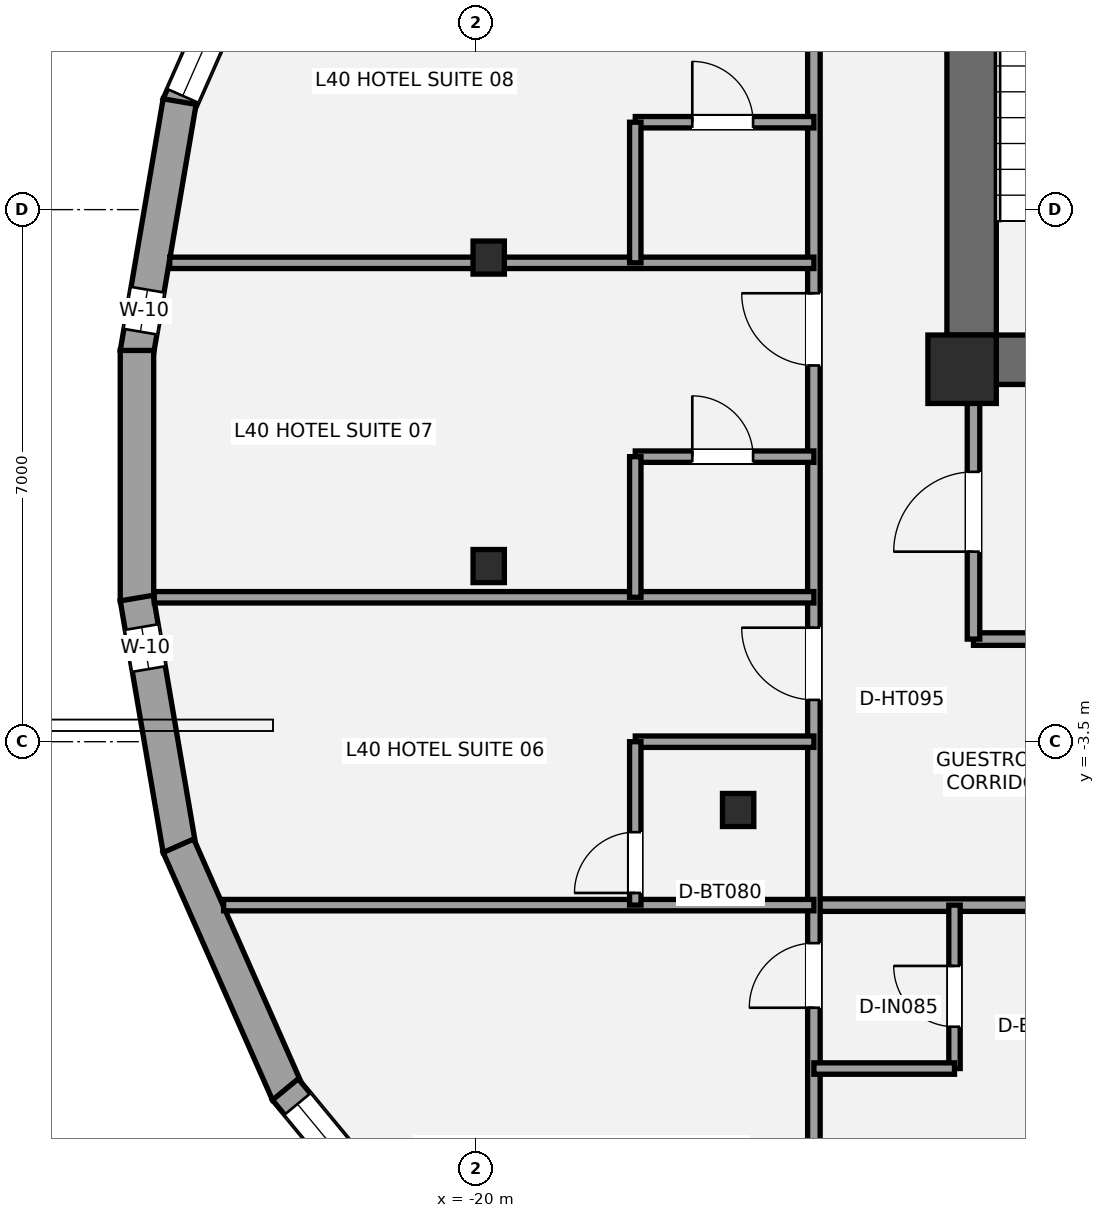
"""IFC4 building model, lengths in metres.
Left out: names, types, materials, properties, quantities, classifications, styles, units other than length and angle.
Written with IfcOpenShell. Run it as: python <this file> out.ifc"""

import sys

from ifc_helpers import new_model, si_unit, direction, frame, frame_2d, origin, origin_2d, place, context, subcontext, project, spatial, rectangle, i_section, extrude, element, fill, save


model = new_model("IFC4")
c1 = context("Model", 3, precision=1e-05, world=origin(), true_north=direction((0.0, 1.0)))
c2 = subcontext(c1, "Body", "Model", "MODEL_VIEW")
j1 = project(units=[si_unit("LENGTHUNIT", "METRE"), si_unit("PLANEANGLEUNIT", "RADIAN")], contexts=[c1])
p1 = place(None, origin())
s1 = spatial("IfcSite", under=j1, at=p1, CompositionType="ELEMENT")
p2 = place(p1, origin())
s2 = spatial("IfcBuilding", under=s1, at=p2, CompositionType="ELEMENT")
p3 = place(p2, frame((0.0, 0.0, 150.2)))
s3 = spatial("IfcBuildingStorey", under=s2, at=p3, CompositionType="ELEMENT", Elevation=150.2)
p4 = place(p3, frame((-13.475, 1.2, 0.0), z_axis=(0.0, 0.0, 1.0), x_axis=(0.0, 1.0, 0.0)))
e1 = element("IfcWall", 1, at=p4, inside=s3, PredefinedType="SHEAR", context=c2, shape_type="SweptSolid", body=[
    extrude(rectangle(XDim=8.45, YDim=0.65, at=frame_2d((4.225, 0.0))), origin(), (0.0, 0.0, 1.0), 3.2),
])
p5 = place(p3, frame((-4.875, 1.525, 0.0), z_axis=(0.0, 0.0, 1.0), x_axis=(-1.0, 0.0, 0.0)))
e2 = element("IfcWall", 2, at=p5, inside=s3, PredefinedType="SHEAR", context=c2, shape_type="SweptSolid", body=[
    extrude(rectangle(XDim=8.925, YDim=0.65, at=frame_2d((4.462, 0.0))), origin(), (0.0, 0.0, 1.0), 3.2),
])
p6 = place(p5, frame((5.425, 0.0, 0.0)))
e3 = element("IfcOpeningElement", 3, at=p6, cuts=e2, PredefinedType="OPENING", context=c2, shape_type="SweptSolid", body=[
    extrude(rectangle(XDim=1.05, YDim=2.15, at=frame_2d((0.525, 1.075))), frame((0.0, 0.335, 0.0), z_axis=(0.0, -1.0, 0.0), x_axis=(1.0, 0.0, 0.0)), (0.0, 0.0, 1.0), 0.67),
])
p7 = place(p5, frame((3.755, 0.0, 0.0)))
e4 = element("IfcOpeningElement", 4, at=p7, cuts=e2, PredefinedType="OPENING", context=c2, shape_type="SweptSolid", body=[
    extrude(rectangle(XDim=1.1, YDim=2.2, at=frame_2d((0.55, 1.1))), frame((0.0, 0.335, 0.0), z_axis=(0.0, -1.0, 0.0), x_axis=(1.0, 0.0, 0.0)), (0.0, 0.0, 1.0), 0.67),
])
p8 = place(p3, frame((-13.6, 1.4, 0.0), z_axis=(0.0, 0.0, 1.0), x_axis=(1.0, 0.0, 0.0)))
e5 = element("IfcColumn", 5, at=p8, inside=s3, PredefinedType="COLUMN", context=c2, shape_type="SweptSolid", body=[
    extrude(rectangle(XDim=0.9, YDim=0.9, at=origin_2d()), origin(), (0.0, 0.0, 1.0), 3.2),
])
for number, where, z_axis, x_axis in (
    (6, (-19.828, 2.869, 0.0), (0.0, 0.0, 1.0), (1.0, 0.0, 0.0)),
    (7, (-19.828, -1.189, 0.0), (0.0, 0.0, 1.0), (1.0, 0.0, 0.0)),
    (8, (-16.547, -4.398, 0.0), (0.0, 0.0, 1.0), (1.0, 0.0, 0.0)),
):
    element("IfcColumn", number, at=place(p3, frame(where, z_axis=z_axis, x_axis=x_axis)), inside=s3, PredefinedType="COLUMN", context=c2, shape_type="SweptSolid", body=[
        extrude(i_section(OverallWidth=0.412, OverallDepth=0.435, WebThickness=0.036, FlangeThickness=0.057, at=origin_2d()), origin(), (0.0, 0.0, 1.0), 3.2),
    ])
p9 = place(p3, frame((-23.911, 4.869, 0.0), z_axis=(0.0, 0.0, 1.0), x_axis=(0.403999745193, 0.914759097186, 0.0)))
e9 = element("IfcWall", 9, at=p9, inside=s3, PredefinedType="STANDARD", context=c2, shape_type="SweptSolid", body=[
    extrude(rectangle(XDim=3.561, YDim=0.44, at=frame_2d((1.78, 0.0))), origin(), (0.0, 0.0, 1.0), 2.315),
])
p10 = place(p9, frame((0.14, 0.0, 0.42)))
e10 = element("IfcOpeningElement", 10, at=p10, cuts=e9, PredefinedType="OPENING", context=c2, shape_type="SweptSolid", body=[
    extrude(rectangle(XDim=0.9, YDim=1.35, at=frame_2d((0.45, 0.675))), frame((0.0, 0.23, 0.0), z_axis=(0.0, -1.0, 0.0), x_axis=(1.0, 0.0, 0.0)), (0.0, 0.0, 1.0), 0.46),
])
p11 = place(p3, frame((-24.459, 1.61, 0.0), z_axis=(0.0, 0.0, 1.0), x_axis=(0.168075929829, 0.985774052109, 0.0)))
e11 = element("IfcWall", 11, at=p11, inside=s3, PredefinedType="STANDARD", context=c2, shape_type="SweptSolid", body=[
    extrude(rectangle(XDim=3.358, YDim=0.44, at=frame_2d((1.679, 0.0))), origin(), (0.0, 0.0, 1.0), 2.315),
])
p12 = place(p11, frame((0.288, 0.0, 0.58)))
e12 = element("IfcOpeningElement", 12, at=p12, cuts=e11, PredefinedType="OPENING", context=c2, shape_type="SweptSolid", body=[
    extrude(rectangle(XDim=0.56, YDim=1.15, at=frame_2d((0.28, 0.575))), frame((0.0, 0.23, 0.0), z_axis=(0.0, -1.0, 0.0), x_axis=(1.0, 0.0, 0.0)), (0.0, 0.0, 1.0), 0.46),
])
p13 = place(p3, frame((-24.456, -1.647, 0.0), z_axis=(0.0, 0.0, 1.0), x_axis=(0.0, 1.0, 0.0)))
e13 = element("IfcWall", 13, at=p13, inside=s3, PredefinedType="STANDARD", context=c2, shape_type="SweptSolid", body=[
    extrude(rectangle(XDim=3.295, YDim=0.44, at=frame_2d((1.647, 0.0))), origin(), (0.0, 0.0, 1.0), 2.315),
])
p14 = place(p3, frame((-23.895, -4.921, 0.0), z_axis=(0.0, 0.0, 1.0), x_axis=(-0.168075929829, 0.985774052109, 0.0)))
e14 = element("IfcWall", 14, at=p14, inside=s3, PredefinedType="STANDARD", context=c2, shape_type="SweptSolid", body=[
    extrude(rectangle(XDim=3.358, YDim=0.44, at=frame_2d((1.679, 0.0))), origin(), (0.0, 0.0, 1.0), 2.315),
])
p15 = place(p14, frame((2.411, 0.0, 0.58)))
e15 = element("IfcOpeningElement", 15, at=p15, cuts=e14, PredefinedType="OPENING", context=c2, shape_type="SweptSolid", body=[
    extrude(rectangle(XDim=0.56, YDim=1.15, at=frame_2d((0.28, 0.575))), frame((0.0, 0.23, 0.0), z_axis=(0.0, -1.0, 0.0), x_axis=(1.0, 0.0, 0.0)), (0.0, 0.0, 1.0), 0.46),
])
p16 = place(p3, frame((-22.472, -8.126, 0.0), z_axis=(0.0, 0.0, 1.0), x_axis=(-0.403999745193, 0.914759097186, 0.0)))
e16 = element("IfcWall", 16, at=p16, inside=s3, PredefinedType="STANDARD", context=c2, shape_type="SweptSolid", body=[
    extrude(rectangle(XDim=3.561, YDim=0.44, at=frame_2d((1.78, 0.0))), origin(), (0.0, 0.0, 1.0), 2.315),
])
p17 = place(p3, frame((-20.014, -11.088, 0.0), z_axis=(0.0, 0.0, 1.0), x_axis=(-0.637002505989, 0.77086173038, 0.0)))
e17 = element("IfcWall", 17, at=p17, inside=s3, PredefinedType="STANDARD", context=c2, shape_type="SweptSolid", body=[
    extrude(rectangle(XDim=3.908, YDim=0.44, at=frame_2d((1.954, 0.0))), origin(), (0.0, 0.0, 1.0), 2.315),
])
p18 = place(p17, frame((2.76, 0.0, 0.58)))
e18 = element("IfcOpeningElement", 18, at=p18, cuts=e17, PredefinedType="OPENING", context=c2, shape_type="SweptSolid", body=[
    extrude(rectangle(XDim=0.9, YDim=1.35, at=frame_2d((0.45, 0.675))), frame((0.0, 0.23, 0.0), z_axis=(0.0, -1.0, 0.0), x_axis=(1.0, 0.0, 0.0)), (0.0, 0.0, 1.0), 0.46),
])
p19 = place(p3, frame((-13.45, -2.15, 0.0), z_axis=(0.0, 0.0, 1.0), x_axis=(1.0, 0.0, 0.0)))
e19 = element("IfcWall", 19, at=p19, inside=s3, PredefinedType="PARTITIONING", context=c2, shape_type="SweptSolid", body=[
    extrude(rectangle(XDim=6.25, YDim=0.165, at=frame_2d((3.125, 0.0))), origin(), (0.0, 0.0, 1.0), 2.473),
])
p20 = place(p3, frame((-13.45, -2.15, 0.0), z_axis=(0.0, 0.0, 1.0), x_axis=(0.0, 1.0, 0.0)))
e20 = element("IfcWall", 20, at=p20, inside=s3, PredefinedType="PARTITIONING", context=c2, shape_type="SweptSolid", body=[
    extrude(rectangle(XDim=3.4, YDim=0.165, at=frame_2d((1.7, 0.0))), origin(), (0.0, 0.0, 1.0), 2.473),
])
p21 = place(p20, frame((1.15, 0.0, 0.0)))
e21 = element("IfcOpeningElement", 21, at=p21, cuts=e20, PredefinedType="OPENING", context=c2, shape_type="SweptSolid", body=[
    extrude(rectangle(XDim=1.05, YDim=2.15, at=frame_2d((0.525, 1.075))), frame((0.0, 0.093, 0.0), z_axis=(0.0, -1.0, 0.0), x_axis=(1.0, 0.0, 0.0)), (0.0, 0.0, 1.0), 0.185),
])
p22 = place(p3, frame((-15.55, -5.65, 0.0), z_axis=(0.0, 0.0, 1.0), x_axis=(1.0, 0.0, 0.0)))
e22 = element("IfcWall", 22, at=p22, inside=s3, PredefinedType="PARTITIONING", context=c2, shape_type="SweptSolid", body=[
    extrude(rectangle(XDim=31.1, YDim=0.165, at=frame_2d((15.55, 0.0))), origin(), (0.0, 0.0, 1.0), 2.398),
])
p23 = place(p22, frame((4.6, 0.0, 0.0)))
e23 = element("IfcOpeningElement", 23, at=p23, cuts=e22, PredefinedType="OPENING", context=c2, shape_type="SweptSolid", body=[
    extrude(rectangle(XDim=0.95, YDim=2.15, at=frame_2d((0.475, 1.075))), frame((0.0, 0.093, 0.0), z_axis=(0.0, -1.0, 0.0), x_axis=(1.0, 0.0, 0.0)), (0.0, 0.0, 1.0), 0.185),
])
p24 = place(p22, frame((11.0, 0.0, 0.0)))
e24 = element("IfcOpeningElement", 24, at=p24, cuts=e22, PredefinedType="OPENING", context=c2, shape_type="SweptSolid", body=[
    extrude(rectangle(XDim=0.95, YDim=2.15, at=frame_2d((0.475, 1.075))), frame((0.0, 0.093, 0.0), z_axis=(0.0, -1.0, 0.0), x_axis=(1.0, 0.0, 0.0)), (0.0, 0.0, 1.0), 0.185),
])
p25 = place(p22, frame((17.4, 0.0, 0.0)))
e25 = element("IfcOpeningElement", 25, at=p25, cuts=e22, PredefinedType="OPENING", context=c2, shape_type="SweptSolid", body=[
    extrude(rectangle(XDim=0.95, YDim=2.15, at=frame_2d((0.475, 1.075))), frame((0.0, 0.093, 0.0), z_axis=(0.0, -1.0, 0.0), x_axis=(1.0, 0.0, 0.0)), (0.0, 0.0, 1.0), 0.185),
])
p26 = place(p22, frame((23.8, 0.0, 0.0)))
e26 = element("IfcOpeningElement", 26, at=p26, cuts=e22, PredefinedType="OPENING", context=c2, shape_type="SweptSolid", body=[
    extrude(rectangle(XDim=0.95, YDim=2.15, at=frame_2d((0.475, 1.075))), frame((0.0, 0.093, 0.0), z_axis=(0.0, -1.0, 0.0), x_axis=(1.0, 0.0, 0.0)), (0.0, 0.0, 1.0), 0.185),
])
p27 = place(p22, frame((29.75, 0.0, 0.0)))
e27 = element("IfcOpeningElement", 27, at=p27, cuts=e22, PredefinedType="OPENING", context=c2, shape_type="SweptSolid", body=[
    extrude(rectangle(XDim=0.95, YDim=2.15, at=frame_2d((0.475, 1.075))), frame((0.0, 0.093, 0.0), z_axis=(0.0, -1.0, 0.0), x_axis=(1.0, 0.0, 0.0)), (0.0, 0.0, 1.0), 0.185),
])
p28 = place(p3, frame((-15.55, -13.587, 0.0), z_axis=(0.0, 0.0, 1.0), x_axis=(0.0, 1.0, 0.0)))
e28 = element("IfcWall", 28, at=p28, inside=s3, PredefinedType="PARTITIONING", context=c2, shape_type="SweptSolid", body=[
    extrude(rectangle(XDim=21.137, YDim=0.165, at=frame_2d((10.568, 0.0))), origin(), (0.0, 0.0, 1.0), 2.473),
])
p29 = place(p28, frame((6.587, 0.0, 0.0)))
e29 = element("IfcOpeningElement", 29, at=p29, cuts=e28, PredefinedType="OPENING", context=c2, shape_type="SweptSolid", body=[
    extrude(rectangle(XDim=0.85, YDim=2.1, at=frame_2d((0.425, 1.05))), frame((0.0, 0.093, 0.0), z_axis=(0.0, -1.0, 0.0), x_axis=(1.0, 0.0, 0.0)), (0.0, 0.0, 1.0), 0.185),
])
p30 = place(p28, frame((10.637, 0.0, 0.0)))
e30 = element("IfcOpeningElement", 30, at=p30, cuts=e28, PredefinedType="OPENING", context=c2, shape_type="SweptSolid", body=[
    extrude(rectangle(XDim=0.95, YDim=2.15, at=frame_2d((0.475, 1.075))), frame((0.0, 0.093, 0.0), z_axis=(0.0, -1.0, 0.0), x_axis=(1.0, 0.0, 0.0)), (0.0, 0.0, 1.0), 0.185),
])
p31 = place(p28, frame((15.037, 0.0, 0.0)))
e31 = element("IfcOpeningElement", 31, at=p31, cuts=e28, PredefinedType="OPENING", context=c2, shape_type="SweptSolid", body=[
    extrude(rectangle(XDim=0.95, YDim=2.15, at=frame_2d((0.475, 1.075))), frame((0.0, 0.093, 0.0), z_axis=(0.0, -1.0, 0.0), x_axis=(1.0, 0.0, 0.0)), (0.0, 0.0, 1.0), 0.185),
])
p32 = place(p28, frame((19.787, 0.0, 0.0)))
e32 = element("IfcOpeningElement", 32, at=p32, cuts=e28, PredefinedType="OPENING", context=c2, shape_type="SweptSolid", body=[
    extrude(rectangle(XDim=0.95, YDim=2.15, at=frame_2d((0.475, 1.075))), frame((0.0, 0.093, 0.0), z_axis=(0.0, -1.0, 0.0), x_axis=(1.0, 0.0, 0.0)), (0.0, 0.0, 1.0), 0.185),
])
p33 = place(p3, frame((-23.316, -5.65, 0.0), z_axis=(0.0, 0.0, 1.0), x_axis=(1.0, 0.0, 0.0)))
e33 = element("IfcWall", 33, at=p33, inside=s3, PredefinedType="PLUMBINGWALL", context=c2, shape_type="SweptSolid", body=[
    extrude(rectangle(XDim=7.766, YDim=0.15, at=frame_2d((3.883, 0.0))), origin(), (0.0, 0.0, 1.0), 2.473),
])
p34 = place(p3, frame((-13.7, -7.8, 0.0), z_axis=(0.0, 0.0, 1.0), x_axis=(0.0, 1.0, 0.0)))
e34 = element("IfcWall", 34, at=p34, inside=s3, PredefinedType="PLUMBINGWALL", context=c2, shape_type="SweptSolid", body=[
    extrude(rectangle(XDim=2.15, YDim=0.15, at=frame_2d((1.075, 0.0))), origin(), (0.0, 0.0, 1.0), 2.473),
])
p35 = place(p34, frame((0.55, 0.0, 0.0)))
e35 = element("IfcOpeningElement", 35, at=p35, cuts=e34, PredefinedType="OPENING", context=c2, shape_type="SweptSolid", body=[
    extrude(rectangle(XDim=0.8, YDim=2.1, at=frame_2d((0.4, 1.05))), frame((0.0, 0.085, 0.0), z_axis=(0.0, -1.0, 0.0), x_axis=(1.0, 0.0, 0.0)), (0.0, 0.0, 1.0), 0.17),
])
p36 = place(p3, frame((-15.55, -7.8, 0.0), z_axis=(0.0, 0.0, 1.0), x_axis=(1.0, 0.0, 0.0)))
e36 = element("IfcWall", 36, at=p36, inside=s3, PredefinedType="PLUMBINGWALL", context=c2, shape_type="SweptSolid", body=[
    extrude(rectangle(XDim=1.85, YDim=0.15, at=frame_2d((0.925, 0.0))), origin(), (0.0, 0.0, 1.0), 3.02),
])
p37 = place(p3, frame((-24.228, -1.6, 0.0), z_axis=(0.0, 0.0, 1.0), x_axis=(1.0, 0.0, 0.0)))
e37 = element("IfcWall", 37, at=p37, inside=s3, PredefinedType="PLUMBINGWALL", context=c2, shape_type="SweptSolid", body=[
    extrude(rectangle(XDim=8.678, YDim=0.15, at=frame_2d((4.339, 0.0))), origin(), (0.0, 0.0, 1.0), 2.398),
])
p38 = place(p3, frame((-24.025, 2.8, 0.0), z_axis=(0.0, 0.0, 1.0), x_axis=(1.0, 0.0, 0.0)))
e38 = element("IfcWall", 38, at=p38, inside=s3, PredefinedType="PLUMBINGWALL", context=c2, shape_type="SweptSolid", body=[
    extrude(rectangle(XDim=8.475, YDim=0.15, at=frame_2d((4.238, 0.0))), origin(), (0.0, 0.0, 1.0), 2.473),
])
p39 = place(p3, frame((-17.9, -3.5, 0.0), z_axis=(0.0, 0.0, 1.0), x_axis=(1.0, 0.0, 0.0)))
e39 = element("IfcWall", 39, at=p39, inside=s3, PredefinedType="PLUMBINGWALL", context=c2, shape_type="SweptSolid", body=[
    extrude(rectangle(XDim=2.35, YDim=0.15, at=frame_2d((1.175, 0.0))), origin(), (0.0, 0.0, 1.0), 2.398),
])
p40 = place(p3, frame((-17.9, -5.65, 0.0), z_axis=(0.0, 0.0, 1.0), x_axis=(0.0, 1.0, 0.0)))
e40 = element("IfcWall", 40, at=p40, inside=s3, PredefinedType="PLUMBINGWALL", context=c2, shape_type="SweptSolid", body=[
    extrude(rectangle(XDim=2.15, YDim=0.15, at=frame_2d((1.075, 0.0))), origin(), (0.0, 0.0, 1.0), 3.02),
])
p41 = place(p40, frame((0.16, 0.0, 0.0)))
e41 = element("IfcOpeningElement", 41, at=p41, cuts=e40, PredefinedType="OPENING", context=c2, shape_type="SweptSolid", body=[
    extrude(rectangle(XDim=0.8, YDim=2.1, at=frame_2d((0.4, 1.05))), frame((0.0, 0.085, 0.0), z_axis=(0.0, -1.0, 0.0), x_axis=(1.0, 0.0, 0.0)), (0.0, 0.0, 1.0), 0.17),
])
p42 = place(p3, frame((-17.9, 0.25, 0.0), z_axis=(0.0, 0.0, 1.0), x_axis=(1.0, 0.0, 0.0)))
e42 = element("IfcWall", 42, at=p42, inside=s3, PredefinedType="PLUMBINGWALL", context=c2, shape_type="SweptSolid", body=[
    extrude(rectangle(XDim=2.35, YDim=0.15, at=frame_2d((1.175, 0.0))), origin(), (0.0, 0.0, 1.0), 2.473),
])
p43 = place(p42, frame((0.75, 0.0, 0.0)))
e43 = element("IfcOpeningElement", 43, at=p43, cuts=e42, PredefinedType="OPENING", context=c2, shape_type="SweptSolid", body=[
    extrude(rectangle(XDim=0.8, YDim=2.1, at=frame_2d((0.4, 1.05))), frame((0.0, 0.085, 0.0), z_axis=(0.0, -1.0, 0.0), x_axis=(1.0, 0.0, 0.0)), (0.0, 0.0, 1.0), 0.17),
])
p44 = place(p3, frame((-17.9, -1.6, 0.0), z_axis=(0.0, 0.0, 1.0), x_axis=(0.0, 1.0, 0.0)))
e44 = element("IfcWall", 44, at=p44, inside=s3, PredefinedType="PLUMBINGWALL", context=c2, shape_type="SweptSolid", body=[
    extrude(rectangle(XDim=1.85, YDim=0.15, at=frame_2d((0.925, 0.0))), origin(), (0.0, 0.0, 1.0), 3.02),
])
p45 = place(p3, frame((-17.9, 4.65, 0.0), z_axis=(0.0, 0.0, 1.0), x_axis=(1.0, 0.0, 0.0)))
e45 = element("IfcWall", 45, at=p45, inside=s3, PredefinedType="PLUMBINGWALL", context=c2, shape_type="SweptSolid", body=[
    extrude(rectangle(XDim=2.35, YDim=0.15, at=frame_2d((1.175, 0.0))), origin(), (0.0, 0.0, 1.0), 2.473),
])
p46 = place(p45, frame((0.75, 0.0, 0.0)))
e46 = element("IfcOpeningElement", 46, at=p46, cuts=e45, PredefinedType="OPENING", context=c2, shape_type="SweptSolid", body=[
    extrude(rectangle(XDim=0.8, YDim=2.1, at=frame_2d((0.4, 1.05))), frame((0.0, 0.085, 0.0), z_axis=(0.0, -1.0, 0.0), x_axis=(1.0, 0.0, 0.0)), (0.0, 0.0, 1.0), 0.17),
])
p47 = place(p3, frame((-17.9, 2.8, 0.0), z_axis=(0.0, 0.0, 1.0), x_axis=(0.0, 1.0, 0.0)))
e47 = element("IfcWall", 47, at=p47, inside=s3, PredefinedType="PLUMBINGWALL", context=c2, shape_type="SweptSolid", body=[
    extrude(rectangle(XDim=1.85, YDim=0.15, at=frame_2d((0.925, 0.0))), origin(), (0.0, 0.0, 1.0), 3.02),
])
p48 = place(p18, origin())
e48 = element("IfcWindow", 48, at=p48, inside=s3, PartitioningType="SINGLE_PANEL", PredefinedType="WINDOW", context=c2, shape_type="SweptSolid", body=[
    extrude(rectangle(XDim=0.9, YDim=1.35, at=frame_2d((0.45, 0.675))), frame((0.0, -0.01, 0.0), z_axis=(0.0, -1.0, 0.0), x_axis=(1.0, 0.0, 0.0)), (0.0, 0.0, 1.0), 0.06),
])
fill(e18, e48)
p49 = place(p15, origin())
e49 = element("IfcWindow", 49, at=p49, inside=s3, PartitioningType="SINGLE_PANEL", PredefinedType="WINDOW", context=c2, shape_type="SweptSolid", body=[
    extrude(rectangle(XDim=0.56, YDim=1.15, at=frame_2d((0.28, 0.575))), frame((0.0, -0.01, 0.0), z_axis=(0.0, -1.0, 0.0), x_axis=(1.0, 0.0, 0.0)), (0.0, 0.0, 1.0), 0.06),
])
fill(e15, e49)
p50 = place(p12, origin())
e50 = element("IfcWindow", 50, at=p50, inside=s3, PartitioningType="SINGLE_PANEL", PredefinedType="WINDOW", context=c2, shape_type="SweptSolid", body=[
    extrude(rectangle(XDim=0.56, YDim=1.15, at=frame_2d((0.28, 0.575))), frame((0.0, -0.01, 0.0), z_axis=(0.0, -1.0, 0.0), x_axis=(1.0, 0.0, 0.0)), (0.0, 0.0, 1.0), 0.06),
])
fill(e12, e50)
p51 = place(p10, origin())
e51 = element("IfcWindow", 51, at=p51, inside=s3, PartitioningType="SINGLE_PANEL", PredefinedType="WINDOW", context=c2, shape_type="SweptSolid", body=[
    extrude(rectangle(XDim=0.9, YDim=1.35, at=frame_2d((0.45, 0.675))), frame((0.0, -0.01, 0.0), z_axis=(0.0, -1.0, 0.0), x_axis=(1.0, 0.0, 0.0)), (0.0, 0.0, 1.0), 0.06),
])
fill(e10, e51)
p52 = place(p21, origin())
e52 = element("IfcDoor", 52, at=p52, inside=s3, OperationType="SINGLE_SWING_LEFT", PredefinedType="DOOR", context=c2, shape_type="SweptSolid", body=[
    extrude(rectangle(XDim=1.05, YDim=2.15, at=frame_2d((0.525, 1.075))), frame((0.0, 0.025, 0.0), z_axis=(0.0, -1.0, 0.0), x_axis=(1.0, 0.0, 0.0)), (0.0, 0.0, 1.0), 0.05),
])
fill(e21, e52)
p53 = place(p29, origin())
e53 = element("IfcDoor", 53, at=p53, inside=s3, OperationType="SINGLE_SWING_LEFT", PredefinedType="DOOR", context=c2, shape_type="SweptSolid", body=[
    extrude(rectangle(XDim=0.85, YDim=2.1, at=frame_2d((0.425, 1.05))), frame((0.0, 0.025, 0.0), z_axis=(0.0, -1.0, 0.0), x_axis=(1.0, 0.0, 0.0)), (0.0, 0.0, 1.0), 0.05),
])
fill(e29, e53)
p54 = place(p35, origin())
e54 = element("IfcDoor", 54, at=p54, inside=s3, OperationType="SINGLE_SWING_RIGHT", PredefinedType="DOOR", context=c2, shape_type="SweptSolid", body=[
    extrude(rectangle(XDim=0.8, YDim=2.1, at=frame_2d((0.4, 1.05))), frame((0.0, 0.025, 0.0), z_axis=(0.0, -1.0, 0.0), x_axis=(1.0, 0.0, 0.0)), (0.0, 0.0, 1.0), 0.05),
])
fill(e35, e54)
p55 = place(p30, origin())
e55 = element("IfcDoor", 55, at=p55, inside=s3, OperationType="SINGLE_SWING_RIGHT", PredefinedType="DOOR", context=c2, shape_type="SweptSolid", body=[
    extrude(rectangle(XDim=0.95, YDim=2.15, at=frame_2d((0.475, 1.075))), frame((0.0, 0.025, 0.0), z_axis=(0.0, -1.0, 0.0), x_axis=(1.0, 0.0, 0.0)), (0.0, 0.0, 1.0), 0.05),
])
fill(e30, e55)
p56 = place(p41, origin())
e56 = element("IfcDoor", 56, at=p56, inside=s3, OperationType="SINGLE_SWING_LEFT", PredefinedType="DOOR", context=c2, shape_type="SweptSolid", body=[
    extrude(rectangle(XDim=0.8, YDim=2.1, at=frame_2d((0.4, 1.05))), frame((0.0, 0.025, 0.0), z_axis=(0.0, -1.0, 0.0), x_axis=(1.0, 0.0, 0.0)), (0.0, 0.0, 1.0), 0.05),
])
fill(e41, e56)
p57 = place(p31, origin())
e57 = element("IfcDoor", 57, at=p57, inside=s3, OperationType="SINGLE_SWING_RIGHT", PredefinedType="DOOR", context=c2, shape_type="SweptSolid", body=[
    extrude(rectangle(XDim=0.95, YDim=2.15, at=frame_2d((0.475, 1.075))), frame((0.0, 0.025, 0.0), z_axis=(0.0, -1.0, 0.0), x_axis=(1.0, 0.0, 0.0)), (0.0, 0.0, 1.0), 0.05),
])
fill(e31, e57)
p58 = place(p43, origin())
e58 = element("IfcDoor", 58, at=p58, inside=s3, OperationType="SINGLE_SWING_LEFT", PredefinedType="DOOR", context=c2, shape_type="SweptSolid", body=[
    extrude(rectangle(XDim=0.8, YDim=2.1, at=frame_2d((0.4, 1.05))), frame((0.0, 0.025, 0.0), z_axis=(0.0, -1.0, 0.0), x_axis=(1.0, 0.0, 0.0)), (0.0, 0.0, 1.0), 0.05),
])
fill(e43, e58)
p59 = place(p46, origin())
e59 = element("IfcDoor", 59, at=p59, inside=s3, OperationType="SINGLE_SWING_LEFT", PredefinedType="DOOR", context=c2, shape_type="SweptSolid", body=[
    extrude(rectangle(XDim=0.8, YDim=2.1, at=frame_2d((0.4, 1.05))), frame((0.0, 0.025, 0.0), z_axis=(0.0, -1.0, 0.0), x_axis=(1.0, 0.0, 0.0)), (0.0, 0.0, 1.0), 0.05),
])
fill(e46, e59)
save(model, sys.argv[1])
